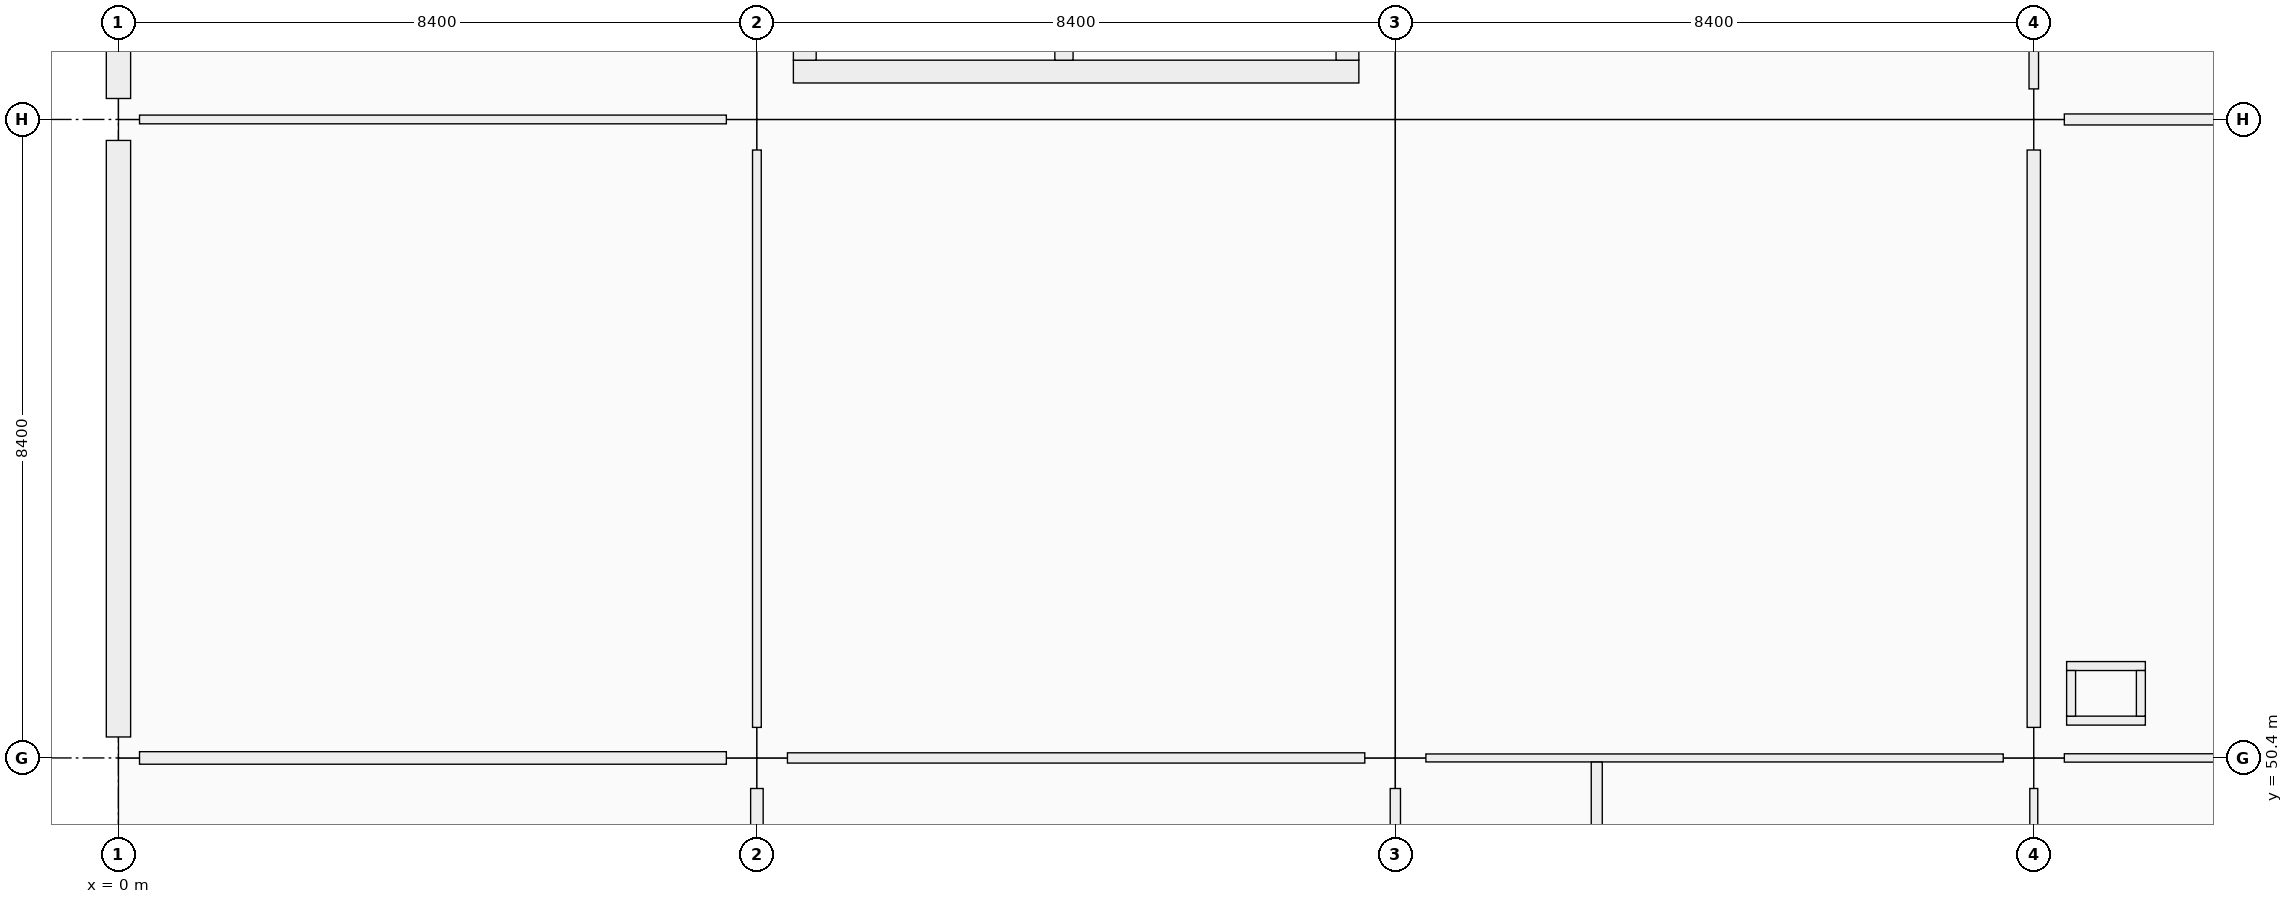
"""IFC4 building model, lengths in metres.
Left out: names, types, materials, properties, quantities, classifications, styles, units other than length and angle.
Written with IfcOpenShell. Run it as: python <this file> out.ifc"""

import sys

from ifc_helpers import new_model, si_unit, direction, frame, frame_2d, origin, origin_2d, place, context, subcontext, project, spatial, rectangle, extrude, element, fill, save


model = new_model("IFC4")
c1 = context("Model", 3, precision=1e-05, world=origin(), true_north=direction((0.0, 1.0)))
c2 = subcontext(c1, "Body", "Model", "MODEL_VIEW")
j1 = project(units=[si_unit("LENGTHUNIT", "METRE"), si_unit("PLANEANGLEUNIT", "RADIAN")], contexts=[c1])
p1 = place(None, origin())
s1 = spatial("IfcSite", under=j1, at=p1, CompositionType="ELEMENT")
p2 = place(p1, origin())
s2 = spatial("IfcBuilding", under=s1, at=p2, CompositionType="ELEMENT")
p3 = place(p2, frame((0.0, 0.0, 5.76)))
s3 = spatial("IfcBuildingStorey", under=s2, at=p3, CompositionType="ELEMENT", Elevation=5.76)
for number, where, z_axis, x_axis in (
    (1, (0.0, 50.4, 0.0), (0.0, 0.0, 1.0), (1.0, 0.0, 0.0)),
    (2, (0.0, 58.8, 0.0), (0.0, 0.0, 1.0), (1.0, 0.0, 0.0)),
):
    element("IfcColumn", number, at=place(p3, frame(where, z_axis=z_axis, x_axis=x_axis)), inside=s3, PredefinedType="COLUMN", context=c2, shape_type="SweptSolid", body=[
        extrude(rectangle(XDim=0.55, YDim=0.55, at=origin_2d()), origin(), (0.0, 0.0, 1.0), 4.2),
    ])
for number, where, z_axis, x_axis in (
    (3, (8.4, 50.4, 0.0), (0.0, 0.0, 1.0), (1.0, 0.0, 0.0)),
    (4, (8.4, 58.8, 0.0), (0.0, 0.0, 1.0), (1.0, 0.0, 0.0)),
    (5, (16.8, 50.4, 0.0), (0.0, 0.0, 1.0), (1.0, 0.0, 0.0)),
    (6, (16.8, 58.8, 0.0), (0.0, 0.0, 1.0), (1.0, 0.0, 0.0)),
    (7, (25.2, 50.4, 0.0), (0.0, 0.0, 1.0), (1.0, 0.0, 0.0)),
    (8, (25.2, 58.8, 0.0), (0.0, 0.0, 1.0), (1.0, 0.0, 0.0)),
):
    element("IfcColumn", number, at=place(p3, frame(where, z_axis=z_axis, x_axis=x_axis)), inside=s3, PredefinedType="COLUMN", context=c2, shape_type="SweptSolid", body=[
        extrude(rectangle(XDim=0.8, YDim=0.8, at=origin_2d()), origin(), (0.0, 0.0, 1.0), 4.5),
    ])
p4 = place(p3, frame((0.0, 50.676, 0.0), z_axis=(0.0, 0.0, 1.0), x_axis=(0.0, 1.0, 0.0)))
e9 = element("IfcWall", 9, at=p4, inside=s3, PredefinedType="SOLIDWALL", context=c2, shape_type="SweptSolid", body=[
    extrude(rectangle(XDim=7.848, YDim=0.32, at=frame_2d((3.924, 0.0))), origin(), (0.0, 0.0, 1.0), 3.4),
])
p5 = place(p4, frame((2.674, 0.0, 0.9)))
e10 = element("IfcOpeningElement", 10, at=p5, cuts=e9, PredefinedType="OPENING", context=c2, shape_type="SweptSolid", body=[
    extrude(rectangle(XDim=2.5, YDim=1.65, at=frame_2d((1.25, 0.825))), frame((0.0, 0.16, 0.0), z_axis=(0.0, -1.0, 0.0), x_axis=(1.0, 0.0, 0.0)), (0.0, 0.0, 1.0), 0.32),
])
p6 = place(p3, frame((0.0, 59.076, 0.0), z_axis=(0.0, 0.0, 1.0), x_axis=(0.0, 1.0, 0.0)))
e11 = element("IfcWall", 11, at=p6, inside=s3, PredefinedType="SOLIDWALL", context=c2, shape_type="SweptSolid", body=[
    extrude(rectangle(XDim=7.848, YDim=0.32, at=frame_2d((3.924, 0.0))), origin(), (0.0, 0.0, 1.0), 3.4),
])
p7 = place(p6, frame((2.724, 0.0, 0.9)))
e12 = element("IfcOpeningElement", 12, at=p7, cuts=e11, PredefinedType="OPENING", context=c2, shape_type="SweptSolid", body=[
    extrude(rectangle(XDim=2.4, YDim=2.25, at=frame_2d((1.2, 1.125))), frame((0.0, 0.16, 0.0), z_axis=(0.0, -1.0, 0.0), x_axis=(1.0, 0.0, 0.0)), (0.0, 0.0, 1.0), 0.32),
])
p8 = place(p3, frame((16.32, 59.43, 0.0), z_axis=(0.0, 0.0, 1.0), x_axis=(-1.0, 0.0, 0.0)))
e13 = element("IfcWall", 13, at=p8, inside=s3, PredefinedType="SHEAR", context=c2, shape_type="SweptSolid", body=[
    extrude(rectangle(XDim=7.44, YDim=0.3, at=frame_2d((3.72, 0.0))), origin(), (0.0, 0.0, 1.0), 4.5),
])
p9 = place(p8, frame((1.28, 0.0, 0.0)))
e14 = element("IfcOpeningElement", 14, at=p9, cuts=e13, PredefinedType="OPENING", context=c2, shape_type="SweptSolid", body=[
    extrude(rectangle(XDim=1.5, YDim=2.15, at=frame_2d((0.75, 1.075))), frame((0.0, 0.15, 0.0), z_axis=(0.0, -1.0, 0.0), x_axis=(1.0, 0.0, 0.0)), (0.0, 0.0, 1.0), 0.3),
])
for number, where, z_axis, x_axis in (
    (15, (9.03, 59.58, 0.0), (0.0, 0.0, 1.0), (0.0, 1.0, 0.0)),
    (16, (16.17, 66.42, 0.0), (0.0, 0.0, 1.0), (0.0, -1.0, 0.0)),
):
    element("IfcWall", number, at=place(p3, frame(where, z_axis=z_axis, x_axis=x_axis)), inside=s3, PredefinedType="SHEAR", context=c2, shape_type="SweptSolid", body=[
        extrude(rectangle(XDim=6.84, YDim=0.3, at=frame_2d((3.42, 0.0))), origin(), (0.0, 0.0, 1.0), 4.5),
    ])
p10 = place(p3, frame((12.44, 59.58, 0.0), z_axis=(0.0, 0.0, 1.0), x_axis=(0.0, 1.0, 0.0)))
e17 = element("IfcWall", 17, at=p10, inside=s3, PredefinedType="SHEAR", context=c2, shape_type="SweptSolid", body=[
    extrude(rectangle(XDim=6.84, YDim=0.24, at=frame_2d((3.42, 0.0))), origin(), (0.0, 0.0, 1.0), 4.5),
])
p11 = place(p10, frame((0.12, 0.0, 0.0)))
e18 = element("IfcOpeningElement", 18, at=p11, cuts=e17, PredefinedType="OPENING", context=c2, shape_type="SweptSolid", body=[
    extrude(rectangle(XDim=1.0, YDim=2.15, at=frame_2d((0.5, 1.075))), frame((0.0, 0.12, 0.0), z_axis=(0.0, -1.0, 0.0), x_axis=(1.0, 0.0, 0.0)), (0.0, 0.0, 1.0), 0.24),
])
for number, where, z_axis, x_axis in (
    (19, (25.632, 50.891, 0.0), (0.0, 0.0, 1.0), (1.0, 0.0, 0.0)),
    (20, (25.632, 51.609, 0.0), (0.0, 0.0, 1.0), (1.0, 0.0, 0.0)),
):
    element("IfcWall", number, at=place(p3, frame(where, z_axis=z_axis, x_axis=x_axis)), inside=s3, PredefinedType="PARTITIONING", context=c2, shape_type="SweptSolid", body=[
        extrude(rectangle(XDim=1.036, YDim=0.118, at=frame_2d((0.518, 0.0))), origin(), (0.0, 0.0, 1.0), 3.48),
    ])
for number, where, z_axis, x_axis in (
    (21, (25.691, 50.95, 0.0), (0.0, 0.0, 1.0), (0.0, 1.0, 0.0)),
    (22, (26.609, 50.95, 0.0), (0.0, 0.0, 1.0), (0.0, 1.0, 0.0)),
):
    element("IfcWall", number, at=place(p3, frame(where, z_axis=z_axis, x_axis=x_axis)), inside=s3, PredefinedType="PARTITIONING", context=c2, shape_type="SweptSolid", body=[
        extrude(rectangle(XDim=0.6, YDim=0.118, at=frame_2d((0.3, 0.0))), origin(), (0.0, 0.0, 1.0), 3.48),
    ])
p12 = place(p3, frame((0.277, 50.4, 0.0), z_axis=(0.0, 0.0, 1.0), x_axis=(1.0, 0.0, 0.0)))
e23 = element("IfcWall", 23, at=p12, inside=s3, PredefinedType="PARTITIONING", context=c2, shape_type="SweptSolid", body=[
    extrude(rectangle(XDim=7.721, YDim=0.165, at=frame_2d((3.86, 0.0))), origin(), (0.0, 0.0, 1.0), 2.4),
])
p13 = place(p12, frame((3.376, 0.0, 0.0)))
e24 = element("IfcOpeningElement", 24, at=p13, cuts=e23, PredefinedType="OPENING", context=c2, shape_type="SweptSolid", body=[
    extrude(rectangle(XDim=0.97, YDim=2.12, at=frame_2d((0.485, 1.06))), frame((0.0, 0.083, 0.0), z_axis=(0.0, -1.0, 0.0), x_axis=(1.0, 0.0, 0.0)), (0.0, 0.0, 1.0), 0.165),
])
p14 = place(p3, frame((0.277, 58.8, 0.0), z_axis=(0.0, 0.0, 1.0), x_axis=(1.0, 0.0, 0.0)))
e25 = element("IfcWall", 25, at=p14, inside=s3, PredefinedType="PARTITIONING", context=c2, shape_type="SweptSolid", body=[
    extrude(rectangle(XDim=7.721, YDim=0.115, at=frame_2d((3.86, 0.0))), origin(), (0.0, 0.0, 1.0), 2.4),
])
p15 = place(p14, frame((3.361, 0.0, 0.0)))
e26 = element("IfcOpeningElement", 26, at=p15, cuts=e25, PredefinedType="OPENING", context=c2, shape_type="SweptSolid", body=[
    extrude(rectangle(XDim=1.0, YDim=2.2, at=frame_2d((0.5, 1.1))), frame((0.0, 0.058, 0.0), z_axis=(0.0, -1.0, 0.0), x_axis=(1.0, 0.0, 0.0)), (0.0, 0.0, 1.0), 0.115),
])
p16 = place(p3, frame((8.802, 50.4, 0.0), z_axis=(0.0, 0.0, 1.0), x_axis=(1.0, 0.0, 0.0)))
e27 = element("IfcWall", 27, at=p16, inside=s3, PredefinedType="PARTITIONING", context=c2, shape_type="SweptSolid", body=[
    extrude(rectangle(XDim=7.596, YDim=0.135, at=frame_2d((3.798, 0.0))), origin(), (0.0, 0.0, 1.0), 2.4),
])
p17 = place(p16, frame((3.328, 0.0, 0.0)))
e28 = element("IfcOpeningElement", 28, at=p17, cuts=e27, PredefinedType="OPENING", context=c2, shape_type="SweptSolid", body=[
    extrude(rectangle(XDim=0.94, YDim=2.15, at=frame_2d((0.47, 1.075))), frame((0.0, 0.067, 0.0), z_axis=(0.0, -1.0, 0.0), x_axis=(1.0, 0.0, 0.0)), (0.0, 0.0, 1.0), 0.135),
])
p18 = place(p3, frame((17.202, 50.4, 0.0), z_axis=(0.0, 0.0, 1.0), x_axis=(1.0, 0.0, 0.0)))
e29 = element("IfcWall", 29, at=p18, inside=s3, PredefinedType="PARTITIONING", context=c2, shape_type="SweptSolid", body=[
    extrude(rectangle(XDim=7.596, YDim=0.105, at=frame_2d((3.798, 0.0))), origin(), (0.0, 0.0, 1.0), 2.4),
])
p19 = place(p18, frame((0.583, 0.0, 0.0)))
e30 = element("IfcOpeningElement", 30, at=p19, cuts=e29, PredefinedType="OPENING", context=c2, shape_type="SweptSolid", body=[
    extrude(rectangle(XDim=0.96, YDim=2.1, at=frame_2d((0.48, 1.05))), frame((0.0, 0.052, 0.0), z_axis=(0.0, -1.0, 0.0), x_axis=(1.0, 0.0, 0.0)), (0.0, 0.0, 1.0), 0.105),
])
p20 = place(p18, frame((4.523, 0.0, 0.0)))
e31 = element("IfcOpeningElement", 31, at=p20, cuts=e29, PredefinedType="OPENING", context=c2, shape_type="SweptSolid", body=[
    extrude(rectangle(XDim=0.92, YDim=2.1, at=frame_2d((0.46, 1.05))), frame((0.0, 0.052, 0.0), z_axis=(0.0, -1.0, 0.0), x_axis=(1.0, 0.0, 0.0)), (0.0, 0.0, 1.0), 0.105),
])
p21 = place(p3, frame((25.602, 50.4, 0.0), z_axis=(0.0, 0.0, 1.0), x_axis=(1.0, 0.0, 0.0)))
e32 = element("IfcWall", 32, at=p21, inside=s3, PredefinedType="MOVABLE", context=c2, shape_type="SweptSolid", body=[
    extrude(rectangle(XDim=7.596, YDim=0.11, at=frame_2d((3.798, 0.0))), origin(), (0.0, 0.0, 1.0), 2.4),
])
p22 = place(p21, frame((3.258, 0.0, 0.0)))
e33 = element("IfcOpeningElement", 33, at=p22, cuts=e32, PredefinedType="OPENING", context=c2, shape_type="SweptSolid", body=[
    extrude(rectangle(XDim=1.08, YDim=2.22, at=frame_2d((0.54, 1.11))), frame((0.0, 0.055, 0.0), z_axis=(0.0, -1.0, 0.0), x_axis=(1.0, 0.0, 0.0)), (0.0, 0.0, 1.0), 0.11),
])
p23 = place(p3, frame((25.602, 58.8, 0.0), z_axis=(0.0, 0.0, 1.0), x_axis=(1.0, 0.0, 0.0)))
e34 = element("IfcWall", 34, at=p23, inside=s3, PredefinedType="PARTITIONING", context=c2, shape_type="SweptSolid", body=[
    extrude(rectangle(XDim=7.596, YDim=0.145, at=frame_2d((3.798, 0.0))), origin(), (0.0, 0.0, 1.0), 2.4),
])
p24 = place(p23, frame((3.268, 0.0, 0.0)))
e35 = element("IfcOpeningElement", 35, at=p24, cuts=e34, PredefinedType="OPENING", context=c2, shape_type="SweptSolid", body=[
    extrude(rectangle(XDim=1.06, YDim=2.22, at=frame_2d((0.53, 1.11))), frame((0.0, 0.073, 0.0), z_axis=(0.0, -1.0, 0.0), x_axis=(1.0, 0.0, 0.0)), (0.0, 0.0, 1.0), 0.145),
])
p25 = place(p3, frame((8.4, 42.402, 0.0), z_axis=(0.0, 0.0, 1.0), x_axis=(0.0, 1.0, 0.0)))
e36 = element("IfcWall", 36, at=p25, inside=s3, PredefinedType="PARTITIONING", context=c2, shape_type="SweptSolid", body=[
    extrude(rectangle(XDim=7.596, YDim=0.165, at=frame_2d((3.798, 0.0))), origin(), (0.0, 0.0, 1.0), 2.4),
])
p26 = place(p25, frame((3.318, 0.0, 0.0)))
e37 = element("IfcOpeningElement", 37, at=p26, cuts=e36, PredefinedType="OPENING", context=c2, shape_type="SweptSolid", body=[
    extrude(rectangle(XDim=0.96, YDim=2.18, at=frame_2d((0.48, 1.09))), frame((0.0, 0.083, 0.0), z_axis=(0.0, -1.0, 0.0), x_axis=(1.0, 0.0, 0.0)), (0.0, 0.0, 1.0), 0.165),
])
p27 = place(p3, frame((8.4, 50.802, 0.0), z_axis=(0.0, 0.0, 1.0), x_axis=(0.0, 1.0, 0.0)))
e38 = element("IfcWall", 38, at=p27, inside=s3, PredefinedType="PARTITIONING", context=c2, shape_type="SweptSolid", body=[
    extrude(rectangle(XDim=7.596, YDim=0.115, at=frame_2d((3.798, 0.0))), origin(), (0.0, 0.0, 1.0), 2.4),
])
p28 = place(p27, frame((3.333, 0.0, 0.0)))
e39 = element("IfcOpeningElement", 39, at=p28, cuts=e38, PredefinedType="OPENING", context=c2, shape_type="SweptSolid", body=[
    extrude(rectangle(XDim=0.93, YDim=2.12, at=frame_2d((0.465, 1.06))), frame((0.0, 0.058, 0.0), z_axis=(0.0, -1.0, 0.0), x_axis=(1.0, 0.0, 0.0)), (0.0, 0.0, 1.0), 0.115),
])
p29 = place(p3, frame((16.8, 42.402, 0.0), z_axis=(0.0, 0.0, 1.0), x_axis=(0.0, 1.0, 0.0)))
e40 = element("IfcWall", 40, at=p29, inside=s3, PredefinedType="PARTITIONING", context=c2, shape_type="SweptSolid", body=[
    extrude(rectangle(XDim=7.596, YDim=0.135, at=frame_2d((3.798, 0.0))), origin(), (0.0, 0.0, 1.0), 2.4),
])
p30 = place(p3, frame((25.2, 42.402, 0.0), z_axis=(0.0, 0.0, 1.0), x_axis=(0.0, 1.0, 0.0)))
e41 = element("IfcWall", 41, at=p30, inside=s3, PredefinedType="PARTITIONING", context=c2, shape_type="SweptSolid", body=[
    extrude(rectangle(XDim=7.596, YDim=0.105, at=frame_2d((3.798, 0.0))), origin(), (0.0, 0.0, 1.0), 2.4),
])
p31 = place(p3, frame((25.2, 50.802, 0.0), z_axis=(0.0, 0.0, 1.0), x_axis=(0.0, 1.0, 0.0)))
e42 = element("IfcWall", 42, at=p31, inside=s3, PredefinedType="PARTITIONING", context=c2, shape_type="SweptSolid", body=[
    extrude(rectangle(XDim=7.596, YDim=0.175, at=frame_2d((3.798, 0.0))), origin(), (0.0, 0.0, 1.0), 2.4),
])
p32 = place(p31, frame((3.288, 0.0, 0.0)))
e43 = element("IfcOpeningElement", 43, at=p32, cuts=e42, PredefinedType="OPENING", context=c2, shape_type="SweptSolid", body=[
    extrude(rectangle(XDim=1.02, YDim=2.2, at=frame_2d((0.51, 1.1))), frame((0.0, 0.087, 0.0), z_axis=(0.0, -1.0, 0.0), x_axis=(1.0, 0.0, 0.0)), (0.0, 0.0, 1.0), 0.175),
])
p33 = place(p3, frame((25.2, 59.202, 0.0), z_axis=(0.0, 0.0, 1.0), x_axis=(0.0, 1.0, 0.0)))
e44 = element("IfcWall", 44, at=p33, inside=s3, PredefinedType="PARTITIONING", context=c2, shape_type="SweptSolid", body=[
    extrude(rectangle(XDim=7.596, YDim=0.125, at=frame_2d((3.798, 0.0))), origin(), (0.0, 0.0, 1.0), 2.4),
])
p34 = place(p33, frame((3.298, 0.0, 0.0)))
e45 = element("IfcOpeningElement", 45, at=p34, cuts=e44, PredefinedType="OPENING", context=c2, shape_type="SweptSolid", body=[
    extrude(rectangle(XDim=1.0, YDim=2.2, at=frame_2d((0.5, 1.1))), frame((0.0, 0.062, 0.0), z_axis=(0.0, -1.0, 0.0), x_axis=(1.0, 0.0, 0.0)), (0.0, 0.0, 1.0), 0.125),
])
p35 = place(p3, frame((19.45, 42.08, 0.0), z_axis=(0.0, 0.0, 1.0), x_axis=(0.0, 1.0, 0.0)))
e46 = element("IfcWall", 46, at=p35, inside=s3, PredefinedType="PARTITIONING", context=c2, shape_type="SweptSolid", body=[
    extrude(rectangle(XDim=8.266, YDim=0.145, at=frame_2d((4.133, 0.0))), origin(), (0.0, 0.0, 1.0), 2.4),
])
p36 = place(p5, origin())
e47 = element("IfcWindow", 47, at=p36, inside=s3, PartitioningType="SINGLE_PANEL", PredefinedType="WINDOW", context=c2, shape_type="SweptSolid", body=[
    extrude(rectangle(XDim=2.5, YDim=1.65, at=frame_2d((1.25, 0.825))), frame((0.0, 0.03, 0.0), z_axis=(0.0, -1.0, 0.0), x_axis=(1.0, 0.0, 0.0)), (0.0, 0.0, 1.0), 0.06),
])
fill(e10, e47)
p37 = place(p9, origin())
e48 = element("IfcDoor", 48, at=p37, inside=s3, OperationType="DOUBLE_DOOR_SINGLE_SWING", PredefinedType="DOOR", context=c2, shape_type="SweptSolid", body=[
    extrude(rectangle(XDim=1.5, YDim=2.15, at=frame_2d((0.75, 1.075))), frame((0.0, 0.025, 0.0), z_axis=(0.0, -1.0, 0.0), x_axis=(1.0, 0.0, 0.0)), (0.0, 0.0, 1.0), 0.05),
])
fill(e14, e48)
p38 = place(p19, origin())
e49 = element("IfcDoor", 49, at=p38, inside=s3, OperationType="SINGLE_SWING_RIGHT", PredefinedType="DOOR", context=c2, shape_type="SweptSolid", body=[
    extrude(rectangle(XDim=0.96, YDim=2.1, at=frame_2d((0.48, 1.05))), frame((0.0, 0.025, 0.0), z_axis=(0.0, -1.0, 0.0), x_axis=(1.0, 0.0, 0.0)), (0.0, 0.0, 1.0), 0.05),
])
fill(e30, e49)
p39 = place(p20, origin())
e50 = element("IfcDoor", 50, at=p39, inside=s3, OperationType="SINGLE_SWING_LEFT", PredefinedType="DOOR", context=c2, shape_type="SweptSolid", body=[
    extrude(rectangle(XDim=0.92, YDim=2.1, at=frame_2d((0.46, 1.05))), frame((0.0, 0.025, 0.0), z_axis=(0.0, -1.0, 0.0), x_axis=(1.0, 0.0, 0.0)), (0.0, 0.0, 1.0), 0.05),
])
fill(e31, e50)
p40 = place(p17, origin())
e51 = element("IfcDoor", 51, at=p40, inside=s3, OperationType="SINGLE_SWING_LEFT", PredefinedType="DOOR", context=c2, shape_type="SweptSolid", body=[
    extrude(rectangle(XDim=0.94, YDim=2.15, at=frame_2d((0.47, 1.075))), frame((0.0, 0.025, 0.0), z_axis=(0.0, -1.0, 0.0), x_axis=(1.0, 0.0, 0.0)), (0.0, 0.0, 1.0), 0.05),
])
fill(e28, e51)
p41 = place(p28, origin())
e52 = element("IfcDoor", 52, at=p41, inside=s3, OperationType="SINGLE_SWING_LEFT", PredefinedType="DOOR", context=c2, shape_type="SweptSolid", body=[
    extrude(rectangle(XDim=0.93, YDim=2.12, at=frame_2d((0.465, 1.06))), frame((0.0, 0.025, 0.0), z_axis=(0.0, -1.0, 0.0), x_axis=(1.0, 0.0, 0.0)), (0.0, 0.0, 1.0), 0.05),
])
fill(e39, e52)
p42 = place(p32, origin())
e53 = element("IfcDoor", 53, at=p42, inside=s3, OperationType="SINGLE_SWING_LEFT", PredefinedType="DOOR", context=c2, shape_type="SweptSolid", body=[
    extrude(rectangle(XDim=1.02, YDim=2.2, at=frame_2d((0.51, 1.1))), frame((0.0, 0.025, 0.0), z_axis=(0.0, -1.0, 0.0), x_axis=(1.0, 0.0, 0.0)), (0.0, 0.0, 1.0), 0.05),
])
fill(e43, e53)
p43 = place(p15, origin())
e54 = element("IfcDoor", 54, at=p43, inside=s3, OperationType="SINGLE_SWING_LEFT", PredefinedType="DOOR", context=c2, shape_type="SweptSolid", body=[
    extrude(rectangle(XDim=1.0, YDim=2.2, at=frame_2d((0.5, 1.1))), frame((0.0, 0.025, 0.0), z_axis=(0.0, -1.0, 0.0), x_axis=(1.0, 0.0, 0.0)), (0.0, 0.0, 1.0), 0.05),
])
fill(e26, e54)
p44 = place(p13, origin())
e55 = element("IfcDoor", 55, at=p44, inside=s3, OperationType="SINGLE_SWING_LEFT", PredefinedType="DOOR", context=c2, shape_type="SweptSolid", body=[
    extrude(rectangle(XDim=0.97, YDim=2.12, at=frame_2d((0.485, 1.06))), frame((0.0, 0.025, 0.0), z_axis=(0.0, -1.0, 0.0), x_axis=(1.0, 0.0, 0.0)), (0.0, 0.0, 1.0), 0.05),
])
fill(e24, e55)
save(model, sys.argv[1])
